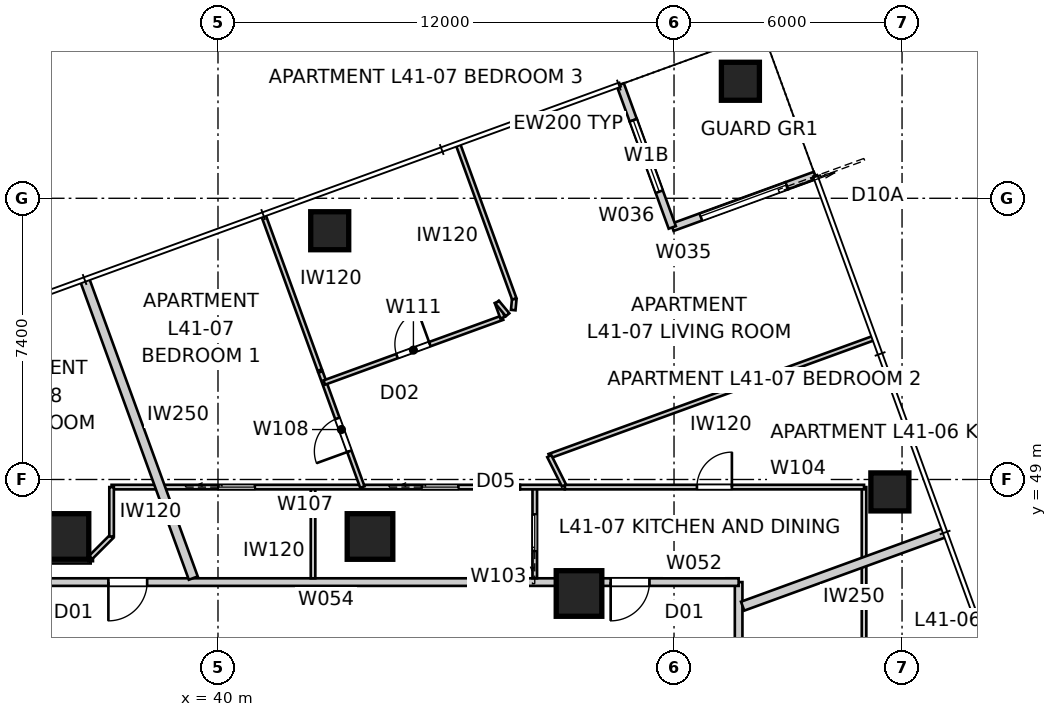
"""IFC4 building model, lengths in metres.
Left out: names, types, materials, properties, quantities, classifications, styles, units other than length and angle.
Written with IfcOpenShell. Run it as: python <this file> out.ifc"""

import sys

from ifc_helpers import new_model, si_unit, direction, frame, frame_2d, origin, origin_2d, place, context, subcontext, project, spatial, rectangle, extrude, element, fill, save


model = new_model("IFC4")
c1 = context("Model", 3, precision=1e-05, world=origin(), true_north=direction((0.0, 1.0)))
c2 = subcontext(c1, "Body", "Model", "MODEL_VIEW")
j1 = project(units=[si_unit("LENGTHUNIT", "METRE"), si_unit("PLANEANGLEUNIT", "RADIAN")], contexts=[c1])
p1 = place(None, origin())
s1 = spatial("IfcSite", under=j1, at=p1, CompositionType="ELEMENT")
p2 = place(p1, origin())
s2 = spatial("IfcBuilding", under=s1, at=p2, CompositionType="ELEMENT")
p3 = place(p2, frame((0.0, 0.0, 150.6)))
s3 = spatial("IfcBuildingStorey", under=s2, at=p3, CompositionType="ELEMENT", Elevation=150.6)
for number, where, z_axis, x_axis in (
    (1, (57.68, 48.673, 0.0), (0.0, 0.0, 1.0), (1.0, 0.0, 0.0)),
    (2, (53.747, 59.479, 0.0), (0.0, 0.0, 1.0), (1.0, 0.0, 0.0)),
    (3, (42.94, 55.546, 0.0), (0.0, 0.0, 1.0), (1.0, 0.0, 0.0)),
):
    element("IfcColumn", number, at=place(p3, frame(where, z_axis=z_axis, x_axis=x_axis)), inside=s3, PredefinedType="COLUMN", context=c2, shape_type="SweptSolid", body=[
        extrude(rectangle(XDim=1.0, YDim=1.0, at=origin_2d()), origin(), (0.0, 0.0, 1.0), 3.4),
    ])
for number, where, z_axis, x_axis in (
    (4, (49.5, 46.0, 0.0), (0.0, 0.0, 1.0), (1.0, 0.0, 0.0)),
    (5, (44.0, 47.5, 0.0), (0.0, 0.0, 1.0), (1.0, 0.0, 0.0)),
    (6, (36.0, 47.5, 0.0), (0.0, 0.0, 1.0), (1.0, 0.0, 0.0)),
):
    element("IfcColumn", number, at=place(p3, frame(where, z_axis=z_axis, x_axis=x_axis)), inside=s3, PredefinedType="COLUMN", context=c2, shape_type="SweptSolid", body=[
        extrude(rectangle(XDim=1.2, YDim=1.2, at=origin_2d()), origin(), (0.0, 0.0, 1.0), 3.4),
    ])
p4 = place(p3, frame((55.712, 57.002, 0.0), z_axis=(0.0, 0.0, 1.0), x_axis=(-0.939659694648, -0.342110593602, 0.0)))
e7 = element("IfcWall", 7, at=p4, inside=s3, PredefinedType="SOLIDWALL", context=c2, shape_type="SweptSolid", body=[
    extrude(rectangle(XDim=0.8, YDim=0.2, at=frame_2d((0.4, 0.0))), origin(), (0.0, 0.0, 1.0), 3.25),
])
p5 = place(p3, frame((54.96, 56.729, 0.0), z_axis=(0.0, 0.0, 1.0), x_axis=(-0.939693144909, -0.342018703306, 0.0)))
e8 = element("IfcWall", 8, at=p5, inside=s3, PredefinedType="SOLIDWALL", context=c2, shape_type="SweptSolid", body=[
    extrude(rectangle(XDim=3.2, YDim=0.2, at=frame_2d((1.6, 0.0))), origin(), (0.0, 0.0, 1.0), 2.722),
])
p6 = place(p5, origin())
e9 = element("IfcOpeningElement", 9, at=p6, cuts=e8, PredefinedType="OPENING", context=c2, shape_type="SweptSolid", body=[
    extrude(rectangle(XDim=2.4, YDim=2.1, at=frame_2d((1.2, 1.05))), frame((0.0, 0.11, 0.0), z_axis=(0.0, -1.0, 0.0), x_axis=(1.0, 0.0, 0.0)), (0.0, 0.0, 1.0), 0.22),
])
p7 = place(p3, frame((51.953, 55.634, 0.0), z_axis=(0.0, 0.0, 1.0), x_axis=(-0.341965219194, 0.939712609717, 0.0)))
e10 = element("IfcWall", 10, at=p7, inside=s3, PredefinedType="SOLIDWALL", context=c2, shape_type="SweptSolid", body=[
    extrude(rectangle(XDim=3.0, YDim=0.2, at=frame_2d((1.5, 0.0))), origin(), (0.0, 0.0, 1.0), 2.722),
])
p8 = place(p7, frame((1.0, 0.0, 0.45)))
e11 = element("IfcOpeningElement", 11, at=p8, cuts=e10, PredefinedType="OPENING", context=c2, shape_type="SweptSolid", body=[
    extrude(rectangle(XDim=2.0, YDim=1.8, at=frame_2d((1.0, 0.9))), frame((0.0, 0.11, 0.0), z_axis=(0.0, -1.0, 0.0), x_axis=(1.0, 0.0, 0.0)), (0.0, 0.0, 1.0), 0.22),
])
p9 = place(p3, frame((50.927, 58.453, 0.0), z_axis=(0.0, 0.0, 1.0), x_axis=(-0.342037080957, 0.939686455819, 0.0)))
e12 = element("IfcWall", 12, at=p9, inside=s3, PredefinedType="SOLIDWALL", context=c2, shape_type="SweptSolid", body=[
    extrude(rectangle(XDim=1.0, YDim=0.2, at=frame_2d((0.5, 0.0))), origin(), (0.0, 0.0, 1.0), 3.25),
])
p10 = place(p3, frame((53.7, 13.3, 0.0), z_axis=(0.0, 0.0, 1.0), x_axis=(0.0, 1.0, 0.0)))
e13 = element("IfcWall", 13, at=p10, inside=s3, PredefinedType="PARTITIONING", context=c2, shape_type="SweptSolid", body=[
    extrude(rectangle(XDim=33.0, YDim=0.2, at=frame_2d((16.5, 0.0))), origin(), (0.0, 0.0, 1.0), 3.25),
])
p11 = place(p10, frame((28.411, 0.0, 0.0)))
e14 = element("IfcOpeningElement", 14, at=p11, cuts=e13, PredefinedType="OPENING", context=c2, shape_type="SweptSolid", body=[
    extrude(rectangle(XDim=1.02, YDim=2.1, at=frame_2d((0.51, 1.05))), frame((0.0, 0.11, 0.0), z_axis=(0.0, -1.0, 0.0), x_axis=(1.0, 0.0, 0.0)), (0.0, 0.0, 1.0), 0.22),
])
p12 = place(p10, frame((13.741, 0.0, 0.0)))
e15 = element("IfcOpeningElement", 15, at=p12, cuts=e13, PredefinedType="OPENING", context=c2, shape_type="SweptSolid", body=[
    extrude(rectangle(XDim=1.02, YDim=2.34, at=frame_2d((0.51, 1.17))), frame((0.0, 0.11, 0.0), z_axis=(0.0, -1.0, 0.0), x_axis=(1.0, 0.0, 0.0)), (0.0, 0.0, 1.0), 0.22),
])
p13 = place(p3, frame((53.7, 46.3, 0.0), z_axis=(0.0, 0.0, 1.0), x_axis=(-1.0, 0.0, 0.0)))
e16 = element("IfcWall", 16, at=p13, inside=s3, PredefinedType="PARTITIONING", context=c2, shape_type="SweptSolid", body=[
    extrude(rectangle(XDim=4.458, YDim=0.2, at=frame_2d((2.229, 0.0))), origin(), (0.0, 0.0, 1.0), 3.25),
])
p14 = place(p13, frame((2.347, 0.0, 0.0)))
e17 = element("IfcOpeningElement", 17, at=p14, cuts=e16, PredefinedType="OPENING", context=c2, shape_type="SweptSolid", body=[
    extrude(rectangle(XDim=1.02, YDim=2.34, at=frame_2d((0.51, 1.17))), frame((0.0, 0.11, 0.0), z_axis=(0.0, -1.0, 0.0), x_axis=(1.0, 0.0, 0.0)), (0.0, 0.0, 1.0), 0.22),
])
p15 = place(p3, frame((49.242, 46.3, 0.0), z_axis=(0.0, 0.0, 1.0), x_axis=(-1.0, 0.0, 0.0)))
e18 = element("IfcWall", 18, at=p15, inside=s3, PredefinedType="PARTITIONING", context=c2, shape_type="SweptSolid", body=[
    extrude(rectangle(XDim=1.683, YDim=0.2, at=frame_2d((0.842, 0.0))), origin(), (0.0, 0.0, 1.0), 2.55),
])
p16 = place(p3, frame((47.558, 46.3, 0.0), z_axis=(0.0, 0.0, 1.0), x_axis=(-1.0, 0.0, 0.0)))
e19 = element("IfcWall", 19, at=p16, inside=s3, PredefinedType="PARTITIONING", context=c2, shape_type="SweptSolid", body=[
    extrude(rectangle(XDim=15.117, YDim=0.2, at=frame_2d((7.558, 0.0))), origin(), (0.0, 0.0, 1.0), 3.25),
])
p17 = place(p16, frame((9.422, 0.0, 0.0)))
e20 = element("IfcOpeningElement", 20, at=p17, cuts=e19, PredefinedType="OPENING", context=c2, shape_type="SweptSolid", body=[
    extrude(rectangle(XDim=1.02, YDim=2.34, at=frame_2d((0.51, 1.17))), frame((0.0, 0.11, 0.0), z_axis=(0.0, -1.0, 0.0), x_axis=(1.0, 0.0, 0.0)), (0.0, 0.0, 1.0), 0.22),
])
p18 = place(p3, frame((36.49, 54.263, 0.0), z_axis=(0.0, 0.0, 1.0), x_axis=(0.342019678743, -0.93969278988, 0.0)))
e21 = element("IfcWall", 21, at=p18, inside=s3, PredefinedType="PARTITIONING", context=c2, shape_type="SweptSolid", body=[
    extrude(rectangle(XDim=8.362, YDim=0.25, at=frame_2d((4.181, 0.0))), origin(), (0.0, 0.0, 1.0), 3.25),
])
p19 = place(p3, frame((59.132, 47.605, 0.0), z_axis=(0.0, 0.0, 1.0), x_axis=(-0.939690274876, -0.342026588591, 0.0)))
e22 = element("IfcWall", 22, at=p19, inside=s3, PredefinedType="PARTITIONING", context=c2, shape_type="SweptSolid", body=[
    extrude(rectangle(XDim=5.669, YDim=0.25, at=frame_2d((2.834, 0.0))), origin(), (0.0, 0.0, 1.0), 3.25),
])
p20 = place(p3, frame((57.0, 48.8, 0.0), z_axis=(0.0, 0.0, 1.0), x_axis=(0.0, -1.0, 0.0)))
e23 = element("IfcWall", 23, at=p20, inside=s3, PredefinedType="PARTITIONING", context=c2, shape_type="SweptSolid", body=[
    extrude(rectangle(XDim=38.113, YDim=0.12, at=frame_2d((19.056, 0.0))), origin(), (0.0, 0.0, 1.0), 2.55),
])
p21 = place(p20, frame((4.198, 0.0, 0.0)))
e24 = element("IfcOpeningElement", 24, at=p21, cuts=e23, PredefinedType="OPENING", context=c2, shape_type="SweptSolid", body=[
    extrude(rectangle(XDim=0.92, YDim=2.34, at=frame_2d((0.46, 1.17))), frame((0.0, 0.07, 0.0), z_axis=(0.0, -1.0, 0.0), x_axis=(1.0, 0.0, 0.0)), (0.0, 0.0, 1.0), 0.14),
])
p22 = place(p20, frame((7.692, 0.0, 0.0)))
e25 = element("IfcOpeningElement", 25, at=p22, cuts=e23, PredefinedType="OPENING", context=c2, shape_type="SweptSolid", body=[
    extrude(rectangle(XDim=0.92, YDim=2.34, at=frame_2d((0.46, 1.17))), frame((0.0, 0.07, 0.0), z_axis=(0.0, -1.0, 0.0), x_axis=(1.0, 0.0, 0.0)), (0.0, 0.0, 1.0), 0.14),
])
p23 = place(p20, frame((20.162, 0.0, 0.0)))
e26 = element("IfcOpeningElement", 26, at=p23, cuts=e23, PredefinedType="OPENING", context=c2, shape_type="SweptSolid", body=[
    extrude(rectangle(XDim=0.92, YDim=2.34, at=frame_2d((0.46, 1.17))), frame((0.0, 0.07, 0.0), z_axis=(0.0, -1.0, 0.0), x_axis=(1.0, 0.0, 0.0)), (0.0, 0.0, 1.0), 0.14),
])
p24 = place(p20, frame((34.056, 0.0, 0.0)))
e27 = element("IfcOpeningElement", 27, at=p24, cuts=e23, PredefinedType="OPENING", context=c2, shape_type="SweptSolid", body=[
    extrude(rectangle(XDim=0.92, YDim=2.34, at=frame_2d((0.46, 1.17))), frame((0.0, 0.07, 0.0), z_axis=(0.0, -1.0, 0.0), x_axis=(1.0, 0.0, 0.0)), (0.0, 0.0, 1.0), 0.14),
])
p25 = place(p20, frame((24.482, 0.0, 0.0)))
e28 = element("IfcOpeningElement", 28, at=p25, cuts=e23, PredefinedType="OPENING", context=c2, shape_type="SweptSolid", body=[
    extrude(rectangle(XDim=0.96, YDim=2.1, at=frame_2d((0.48, 1.05))), frame((0.0, 0.07, 0.0), z_axis=(0.0, -1.0, 0.0), x_axis=(1.0, 0.0, 0.0)), (0.0, 0.0, 1.0), 0.14),
])
p26 = place(p3, frame((48.336, 46.4, 0.0), z_axis=(0.0, 0.0, 1.0), x_axis=(0.0, 1.0, 0.0)))
e29 = element("IfcWall", 29, at=p26, inside=s3, PredefinedType="PARTITIONING", context=c2, shape_type="SweptSolid", body=[
    extrude(rectangle(XDim=2.4, YDim=0.12, at=frame_2d((1.2, 0.0))), origin(), (0.0, 0.0, 1.0), 3.25),
])
p27 = place(p26, frame((0.72, 0.0, 0.0)))
e30 = element("IfcOpeningElement", 30, at=p27, cuts=e29, PredefinedType="OPENING", context=c2, shape_type="SweptSolid", body=[
    extrude(rectangle(XDim=0.96, YDim=2.1, at=frame_2d((0.48, 1.05))), frame((0.0, 0.07, 0.0), z_axis=(0.0, -1.0, 0.0), x_axis=(1.0, 0.0, 0.0)), (0.0, 0.0, 1.0), 0.14),
])
p28 = place(p3, frame((49.126, 48.8, 0.0), z_axis=(0.0, 0.0, 1.0), x_axis=(1.0, 0.0, 0.0)))
e31 = element("IfcWall", 31, at=p28, inside=s3, PredefinedType="PARTITIONING", context=c2, shape_type="SweptSolid", body=[
    extrude(rectangle(XDim=7.874, YDim=0.12, at=frame_2d((3.937, 0.0))), origin(), (0.0, 0.0, 1.0), 3.25),
])
p29 = place(p28, frame((3.477, 0.0, 0.0)))
e32 = element("IfcOpeningElement", 32, at=p29, cuts=e31, PredefinedType="OPENING", context=c2, shape_type="SweptSolid", body=[
    extrude(rectangle(XDim=0.92, YDim=2.34, at=frame_2d((0.46, 1.17))), frame((0.0, 0.07, 0.0), z_axis=(0.0, -1.0, 0.0), x_axis=(1.0, 0.0, 0.0)), (0.0, 0.0, 1.0), 0.14),
])
p30 = place(p3, frame((42.501, 46.4, 0.0), z_axis=(0.0, 0.0, 1.0), x_axis=(0.0, 1.0, 0.0)))
e33 = element("IfcWall", 33, at=p30, inside=s3, PredefinedType="PARTITIONING", context=c2, shape_type="SweptSolid", body=[
    extrude(rectangle(XDim=2.4, YDim=0.12, at=frame_2d((1.2, 0.0))), origin(), (0.0, 0.0, 1.0), 3.25),
])
p31 = place(p3, frame((37.2, 48.8, 0.0), z_axis=(0.0, 0.0, 1.0), x_axis=(1.0, 0.0, 0.0)))
e34 = element("IfcWall", 34, at=p31, inside=s3, PredefinedType="PARTITIONING", context=c2, shape_type="SweptSolid", body=[
    extrude(rectangle(XDim=10.745, YDim=0.12, at=frame_2d((5.373, 0.0))), origin(), (0.0, 0.0, 1.0), 3.25),
])
p32 = place(p31, frame((8.165, 0.0, 0.0)))
e35 = element("IfcOpeningElement", 35, at=p32, cuts=e34, PredefinedType="OPENING", context=c2, shape_type="SweptSolid", body=[
    extrude(rectangle(XDim=0.96, YDim=2.1, at=frame_2d((0.48, 1.05))), frame((0.0, 0.07, 0.0), z_axis=(0.0, -1.0, 0.0), x_axis=(1.0, 0.0, 0.0)), (0.0, 0.0, 1.0), 0.14),
])
p33 = place(p31, frame((2.81, 0.0, 0.0)))
e36 = element("IfcOpeningElement", 36, at=p33, cuts=e34, PredefinedType="OPENING", context=c2, shape_type="SweptSolid", body=[
    extrude(rectangle(XDim=0.96, YDim=2.1, at=frame_2d((0.48, 1.05))), frame((0.0, 0.07, 0.0), z_axis=(0.0, -1.0, 0.0), x_axis=(1.0, 0.0, 0.0)), (0.0, 0.0, 1.0), 0.14),
])
p34 = place(p3, frame((43.799, 48.8, 0.0), z_axis=(0.0, 0.0, 1.0), x_axis=(-0.342034943783, 0.939687233728, 0.0)))
e37 = element("IfcWall", 37, at=p34, inside=s3, PredefinedType="PARTITIONING", context=c2, shape_type="SweptSolid", body=[
    extrude(rectangle(XDim=3.223, YDim=0.12, at=frame_2d((1.612, 0.0))), origin(), (0.0, 0.0, 1.0), 3.25),
])
p35 = place(p34, frame((1.004, 0.0, 0.0)))
e38 = element("IfcOpeningElement", 38, at=p35, cuts=e37, PredefinedType="OPENING", context=c2, shape_type="SweptSolid", body=[
    extrude(rectangle(XDim=0.92, YDim=2.34, at=frame_2d((0.46, 1.17))), frame((0.0, 0.07, 0.0), z_axis=(0.0, -1.0, 0.0), x_axis=(1.0, 0.0, 0.0)), (0.0, 0.0, 1.0), 0.14),
])
p36 = place(p3, frame((57.231, 52.713, 0.0), z_axis=(0.0, 0.0, 1.0), x_axis=(-0.939692673089, -0.342019999623, 0.0)))
e39 = element("IfcWall", 39, at=p36, inside=s3, PredefinedType="PARTITIONING", context=c2, shape_type="SweptSolid", body=[
    extrude(rectangle(XDim=9.06, YDim=0.12, at=frame_2d((4.53, 0.0))), origin(), (0.0, 0.0, 1.0), 3.25),
])
p37 = place(p3, frame((48.717, 49.615, 0.0), z_axis=(0.0, 0.0, 1.0), x_axis=(0.448117513314, -0.893974660861, 0.0)))
e40 = element("IfcWall", 40, at=p37, inside=s3, PredefinedType="PARTITIONING", context=c2, shape_type="SweptSolid", body=[
    extrude(rectangle(XDim=0.864, YDim=0.12, at=frame_2d((0.432, 0.0))), origin(), (0.0, 0.0, 1.0), 3.25),
])
p38 = place(p3, frame((42.798, 51.551, 0.0), z_axis=(0.0, 0.0, 1.0), x_axis=(0.939699104319, 0.342002329438, 0.0)))
e41 = element("IfcWall", 41, at=p38, inside=s3, PredefinedType="PARTITIONING", context=c2, shape_type="SweptSolid", body=[
    extrude(rectangle(XDim=4.99, YDim=0.12, at=frame_2d((2.495, 0.0))), origin(), (0.0, 0.0, 1.0), 3.25),
])
p39 = place(p38, frame((2.035, 0.0, 0.0)))
e42 = element("IfcOpeningElement", 42, at=p39, cuts=e41, PredefinedType="OPENING", context=c2, shape_type="SweptSolid", body=[
    extrude(rectangle(XDim=0.92, YDim=2.34, at=frame_2d((0.46, 1.17))), frame((0.0, 0.07, 0.0), z_axis=(0.0, -1.0, 0.0), x_axis=(1.0, 0.0, 0.0)), (0.0, 0.0, 1.0), 0.14),
])
for number, where, z_axis, x_axis in (
    (43, (47.487, 53.258, 0.0), (0.0, 0.0, 1.0), (-0.342, 0.94, 0.0)),
    (44, (47.344, 53.667, 0.0), (0.0, 0.0, 1.0), (0.639, -0.77, 0.0)),
):
    element("IfcWall", number, at=place(p3, frame(where, z_axis=z_axis, x_axis=x_axis)), inside=s3, PredefinedType="PARTITIONING", context=c2, shape_type="SweptSolid", body=[
        extrude(rectangle(XDim=0.433, YDim=0.12, at=frame_2d((0.216, 0.0))), origin(), (0.0, 0.0, 1.0), 3.25),
    ])
p40 = place(p3, frame((47.769, 53.458, 0.0), z_axis=(0.0, 0.0, 1.0), x_axis=(0.093212941297, 0.995646195983, 0.0)))
e45 = element("IfcWall", 45, at=p40, inside=s3, PredefinedType="PARTITIONING", context=c2, shape_type="SweptSolid", body=[
    extrude(rectangle(XDim=0.296, YDim=0.12, at=frame_2d((0.148, 0.0))), origin(), (0.0, 0.0, 1.0), 3.25),
])
p41 = place(p3, frame((47.796, 53.752, 0.0), z_axis=(0.0, 0.0, 1.0), x_axis=(-0.342011603146, 0.939695729113, 0.0)))
e46 = element("IfcWall", 46, at=p41, inside=s3, PredefinedType="PARTITIONING", context=c2, shape_type="SweptSolid", body=[
    extrude(rectangle(XDim=4.307, YDim=0.12, at=frame_2d((2.153, 0.0))), origin(), (0.0, 0.0, 1.0), 3.25),
])
p42 = place(p3, frame((41.202, 55.935, 0.0), z_axis=(0.0, 0.0, 1.0), x_axis=(0.341992887332, -0.939702540709, 0.0)))
e47 = element("IfcWall", 47, at=p42, inside=s3, PredefinedType="PARTITIONING", context=c2, shape_type="SweptSolid", body=[
    extrude(rectangle(XDim=4.315, YDim=0.12, at=frame_2d((2.158, 0.0))), origin(), (0.0, 0.0, 1.0), 3.25),
])
p43 = place(p3, frame((35.35, 46.85, 0.0), z_axis=(0.0, 0.0, 1.0), x_axis=(1.0, 0.0, 0.0)))
e48 = element("IfcWall", 48, at=p43, inside=s3, PredefinedType="PARTITIONING", context=c2, shape_type="SweptSolid", body=[
    extrude(rectangle(XDim=1.3, YDim=0.12, at=frame_2d((0.65, 0.0))), origin(), (0.0, 0.0, 1.0), 3.25),
])
p44 = place(p3, frame((36.65, 46.95, 0.0), z_axis=(0.0, 0.0, 1.0), x_axis=(0.707106781187, 0.707106781187, 0.0)))
e49 = element("IfcWall", 49, at=p44, inside=s3, PredefinedType="PARTITIONING", context=c2, shape_type="SweptSolid", body=[
    extrude(rectangle(XDim=0.778, YDim=0.12, at=frame_2d((0.389, 0.0))), origin(), (0.0, 0.0, 1.0), 3.25),
])
p45 = place(p3, frame((37.2, 47.5, 0.0), z_axis=(0.0, 0.0, 1.0), x_axis=(0.0, 1.0, 0.0)))
e50 = element("IfcWall", 50, at=p45, inside=s3, PredefinedType="PARTITIONING", context=c2, shape_type="SweptSolid", body=[
    extrude(rectangle(XDim=1.3, YDim=0.12, at=frame_2d((0.65, 0.0))), origin(), (0.0, 0.0, 1.0), 3.25),
])
p46 = place(p3, frame((49.126, 48.8, 0.0), z_axis=(0.0, 0.0, 1.0), x_axis=(-1.0, 0.0, 0.0)))
e51 = element("IfcWall", 51, at=p46, inside=s3, PredefinedType="PARTITIONING", context=c2, shape_type="SweptSolid", body=[
    extrude(rectangle(XDim=1.181, YDim=0.12, at=frame_2d((0.59, 0.0))), origin(), (0.0, 0.0, 1.0), 3.25),
])
p47 = place(p3, frame((36.65, 46.85, 0.0), z_axis=(0.0, 0.0, 1.0), x_axis=(0.0, 1.0, 0.0)))
e52 = element("IfcWall", 52, at=p47, inside=s3, PredefinedType="PARTITIONING", context=c2, shape_type="SweptSolid", body=[
    extrude(rectangle(XDim=0.1, YDim=0.12, at=frame_2d((0.05, 0.0))), origin(), (0.0, 0.0, 1.0), 3.25),
])
p48 = place(p6, origin())
e53 = element("IfcDoor", 53, at=p48, inside=s3, OperationType="SLIDING_TO_LEFT", PredefinedType="DOOR", context=c2, shape_type="SweptSolid", body=[
    extrude(rectangle(XDim=2.4, YDim=2.1, at=frame_2d((1.2, 1.05))), frame((0.0, 0.025, 0.0), z_axis=(0.0, -1.0, 0.0), x_axis=(1.0, 0.0, 0.0)), (0.0, 0.0, 1.0), 0.05),
])
fill(e9, e53)
p49 = place(p8, origin())
e54 = element("IfcWindow", 54, at=p49, inside=s3, PartitioningType="SINGLE_PANEL", PredefinedType="WINDOW", context=c2, shape_type="SweptSolid", body=[
    extrude(rectangle(XDim=2.0, YDim=1.8, at=frame_2d((1.0, 0.9))), frame((0.0, 0.03, 0.0), z_axis=(0.0, -1.0, 0.0), x_axis=(1.0, 0.0, 0.0)), (0.0, 0.0, 1.0), 0.06),
])
fill(e11, e54)
p50 = place(p17, origin())
e55 = element("IfcDoor", 55, at=p50, inside=s3, OperationType="SINGLE_SWING_RIGHT", PredefinedType="DOOR", context=c2, shape_type="SweptSolid", body=[
    extrude(rectangle(XDim=1.02, YDim=2.34, at=frame_2d((0.51, 1.17))), frame((0.0, 0.025, 0.0), z_axis=(0.0, -1.0, 0.0), x_axis=(1.0, 0.0, 0.0)), (0.0, 0.0, 1.0), 0.05),
])
fill(e20, e55)
p51 = place(p14, origin())
e56 = element("IfcDoor", 56, at=p51, inside=s3, OperationType="SINGLE_SWING_RIGHT", PredefinedType="DOOR", context=c2, shape_type="SweptSolid", body=[
    extrude(rectangle(XDim=1.02, YDim=2.34, at=frame_2d((0.51, 1.17))), frame((0.0, 0.025, 0.0), z_axis=(0.0, -1.0, 0.0), x_axis=(1.0, 0.0, 0.0)), (0.0, 0.0, 1.0), 0.05),
])
fill(e17, e56)
p52 = place(p29, origin())
e57 = element("IfcDoor", 57, at=p52, inside=s3, OperationType="SINGLE_SWING_RIGHT", PredefinedType="DOOR", context=c2, shape_type="SweptSolid", body=[
    extrude(rectangle(XDim=0.92, YDim=2.34, at=frame_2d((0.46, 1.17))), frame((0.0, 0.025, 0.0), z_axis=(0.0, -1.0, 0.0), x_axis=(1.0, 0.0, 0.0)), (0.0, 0.0, 1.0), 0.05),
])
fill(e32, e57)
p53 = place(p27, origin())
e58 = element("IfcDoor", 58, at=p53, inside=s3, OperationType="SLIDING_TO_LEFT", PredefinedType="DOOR", context=c2, shape_type="SweptSolid", body=[
    extrude(rectangle(XDim=0.96, YDim=2.1, at=frame_2d((0.48, 1.05))), frame((0.0, 0.025, 0.0), z_axis=(0.0, -1.0, 0.0), x_axis=(1.0, 0.0, 0.0)), (0.0, 0.0, 1.0), 0.05),
])
fill(e30, e58)
p54 = place(p32, origin())
e59 = element("IfcDoor", 59, at=p54, inside=s3, OperationType="SLIDING_TO_LEFT", PredefinedType="DOOR", context=c2, shape_type="SweptSolid", body=[
    extrude(rectangle(XDim=0.96, YDim=2.1, at=frame_2d((0.48, 1.05))), frame((0.0, 0.025, 0.0), z_axis=(0.0, -1.0, 0.0), x_axis=(1.0, 0.0, 0.0)), (0.0, 0.0, 1.0), 0.05),
])
fill(e35, e59)
p55 = place(p39, origin())
e60 = element("IfcDoor", 60, at=p55, inside=s3, OperationType="SINGLE_SWING_RIGHT", PredefinedType="DOOR", context=c2, shape_type="SweptSolid", body=[
    extrude(rectangle(XDim=0.92, YDim=2.34, at=frame_2d((0.46, 1.17))), frame((0.0, 0.025, 0.0), z_axis=(0.0, -1.0, 0.0), x_axis=(1.0, 0.0, 0.0)), (0.0, 0.0, 1.0), 0.05),
])
fill(e42, e60)
p56 = place(p35, origin())
e61 = element("IfcDoor", 61, at=p56, inside=s3, OperationType="SINGLE_SWING_LEFT", PredefinedType="DOOR", context=c2, shape_type="SweptSolid", body=[
    extrude(rectangle(XDim=0.92, YDim=2.34, at=frame_2d((0.46, 1.17))), frame((0.0, 0.025, 0.0), z_axis=(0.0, -1.0, 0.0), x_axis=(1.0, 0.0, 0.0)), (0.0, 0.0, 1.0), 0.05),
])
fill(e38, e61)
p57 = place(p33, origin())
e62 = element("IfcDoor", 62, at=p57, inside=s3, OperationType="SLIDING_TO_LEFT", PredefinedType="DOOR", context=c2, shape_type="SweptSolid", body=[
    extrude(rectangle(XDim=0.96, YDim=2.1, at=frame_2d((0.48, 1.05))), frame((0.0, 0.025, 0.0), z_axis=(0.0, -1.0, 0.0), x_axis=(1.0, 0.0, 0.0)), (0.0, 0.0, 1.0), 0.05),
])
fill(e36, e62)
save(model, sys.argv[1])
